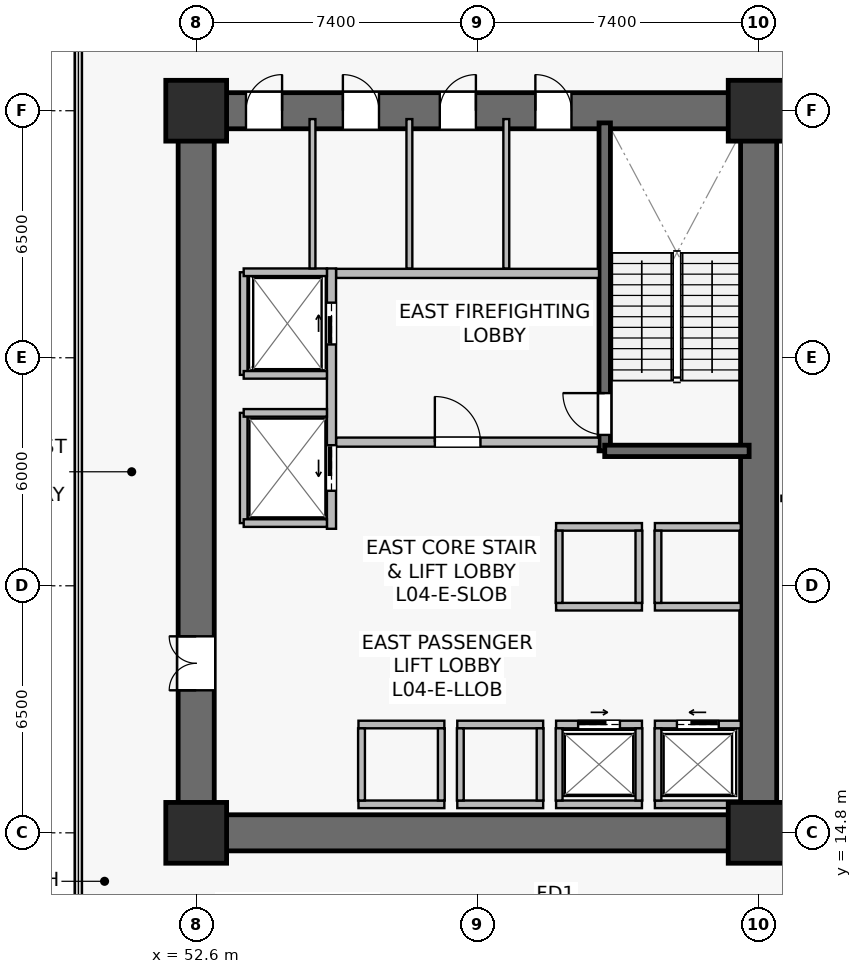
"""IFC4 building model, lengths in metres.
Left out: names, types, materials, properties, quantities, classifications, styles, units other than length and angle.
Written with IfcOpenShell. Run it as: python <this file> out.ifc"""

import sys

from ifc_helpers import new_model, si_unit, direction, frame, frame_2d, origin, origin_2d, place, context, subcontext, project, spatial, rectangle, extrude, source, transform, mapped, element, fill, save


model = new_model("IFC4")
c1 = context("Model", 3, precision=1e-05, world=origin(), true_north=direction((0.0, 1.0)))
c2 = subcontext(c1, "Body", "Model", "MODEL_VIEW")
j1 = project(units=[si_unit("LENGTHUNIT", "METRE"), si_unit("PLANEANGLEUNIT", "RADIAN")], contexts=[c1])
p1 = place(None, origin())
s1 = spatial("IfcSite", under=j1, at=p1, CompositionType="ELEMENT")
p2 = place(p1, origin())
s2 = spatial("IfcBuilding", under=s1, at=p2, CompositionType="ELEMENT")
p3 = place(p2, frame((0.0, 0.0, 15.0)))
s3 = spatial("IfcBuildingStorey", under=s2, at=p3, CompositionType="ELEMENT", Elevation=15.0)
p4 = place(p3, frame((52.125, 14.8, 0.0), z_axis=(0.0, 0.0, 1.0), x_axis=(1.0, 0.0, 0.0)))
e1 = element("IfcWall", 1, at=p4, inside=s3, PredefinedType="SHEAR", context=c2, shape_type="SweptSolid", body=[
    extrude(rectangle(XDim=15.75, YDim=0.95, at=frame_2d((7.875, 0.0))), origin(), (0.0, 0.0, 1.0), 4.45),
])
p5 = place(p3, frame((52.125, 33.8, 0.0), z_axis=(0.0, 0.0, 1.0), x_axis=(1.0, 0.0, 0.0)))
e2 = element("IfcWall", 2, at=p5, inside=s3, PredefinedType="SHEAR", context=c2, shape_type="SweptSolid", body=[
    extrude(rectangle(XDim=15.75, YDim=0.95, at=frame_2d((7.875, 0.0))), origin(), (0.0, 0.0, 1.0), 4.45),
])
p6 = place(p5, frame((9.4, 0.0, 0.0)))
e3 = element("IfcOpeningElement", 3, at=p6, cuts=e2, PredefinedType="OPENING", context=c2, shape_type="SweptSolid", body=[
    extrude(rectangle(XDim=0.95, YDim=2.15, at=frame_2d((0.475, 1.075))), frame((0.0, 0.485, 0.0), z_axis=(0.0, -1.0, 0.0), x_axis=(1.0, 0.0, 0.0)), (0.0, 0.0, 1.0), 0.97),
])
p7 = place(p5, frame((6.885, 0.0, 0.0)))
e4 = element("IfcOpeningElement", 4, at=p7, cuts=e2, PredefinedType="OPENING", context=c2, shape_type="SweptSolid", body=[
    extrude(rectangle(XDim=0.95, YDim=2.15, at=frame_2d((0.475, 1.075))), frame((0.0, 0.485, 0.0), z_axis=(0.0, -1.0, 0.0), x_axis=(1.0, 0.0, 0.0)), (0.0, 0.0, 1.0), 0.97),
])
p8 = place(p5, frame((4.335, 0.0, 0.0)))
e5 = element("IfcOpeningElement", 5, at=p8, cuts=e2, PredefinedType="OPENING", context=c2, shape_type="SweptSolid", body=[
    extrude(rectangle(XDim=0.95, YDim=2.15, at=frame_2d((0.475, 1.075))), frame((0.0, 0.485, 0.0), z_axis=(0.0, -1.0, 0.0), x_axis=(1.0, 0.0, 0.0)), (0.0, 0.0, 1.0), 0.97),
])
p9 = place(p5, frame((1.785, 0.0, 0.0)))
e6 = element("IfcOpeningElement", 6, at=p9, cuts=e2, PredefinedType="OPENING", context=c2, shape_type="SweptSolid", body=[
    extrude(rectangle(XDim=0.95, YDim=2.15, at=frame_2d((0.475, 1.075))), frame((0.0, 0.485, 0.0), z_axis=(0.0, -1.0, 0.0), x_axis=(1.0, 0.0, 0.0)), (0.0, 0.0, 1.0), 0.97),
])
p10 = place(p3, frame((52.6, 15.275, 0.0), z_axis=(0.0, 0.0, 1.0), x_axis=(0.0, 1.0, 0.0)))
e7 = element("IfcWall", 7, at=p10, inside=s3, PredefinedType="SHEAR", context=c2, shape_type="SweptSolid", body=[
    extrude(rectangle(XDim=18.05, YDim=0.95, at=frame_2d((9.025, 0.0))), origin(), (0.0, 0.0, 1.0), 4.45),
])
p11 = place(p10, frame((3.275, 0.0, 0.0)))
e8 = element("IfcOpeningElement", 8, at=p11, cuts=e7, PredefinedType="OPENING", context=c2, shape_type="SweptSolid", body=[
    extrude(rectangle(XDim=1.42, YDim=2.2, at=frame_2d((0.71, 1.1))), frame((0.0, 0.485, 0.0), z_axis=(0.0, -1.0, 0.0), x_axis=(1.0, 0.0, 0.0)), (0.0, 0.0, 1.0), 0.97),
])
p12 = place(p3, frame((67.4, 15.275, 0.0), z_axis=(0.0, 0.0, 1.0), x_axis=(0.0, 1.0, 0.0)))
e9 = element("IfcWall", 9, at=p12, inside=s3, PredefinedType="SHEAR", context=c2, shape_type="SweptSolid", body=[
    extrude(rectangle(XDim=18.05, YDim=0.95, at=frame_2d((9.025, 0.0))), origin(), (0.0, 0.0, 1.0), 4.45),
])
p13 = place(p3, frame((63.35, 24.85, 0.0), z_axis=(0.0, 0.0, 1.0), x_axis=(0.0, 1.0, 0.0)))
e10 = element("IfcWall", 10, at=p13, inside=s3, PredefinedType="SHEAR", context=c2, shape_type="SweptSolid", body=[
    extrude(rectangle(XDim=8.63, YDim=0.3, at=frame_2d((4.315, 0.0))), origin(), (0.0, 0.0, 1.0), 4.45),
])
p14 = place(p13, frame((0.42, 0.0, 0.0)))
e11 = element("IfcOpeningElement", 11, at=p14, cuts=e10, PredefinedType="OPENING", context=c2, shape_type="SweptSolid", body=[
    extrude(rectangle(XDim=1.1, YDim=2.15, at=frame_2d((0.55, 1.075))), frame((0.0, 0.16, 0.0), z_axis=(0.0, -1.0, 0.0), x_axis=(1.0, 0.0, 0.0)), (0.0, 0.0, 1.0), 0.32),
])
p15 = place(p3, frame((63.35, 24.85, 0.0), z_axis=(0.0, 0.0, 1.0), x_axis=(1.0, 0.0, 0.0)))
e12 = element("IfcWall", 12, at=p15, inside=s3, PredefinedType="SHEAR", context=c2, shape_type="SweptSolid", body=[
    extrude(rectangle(XDim=3.8, YDim=0.3, at=frame_2d((1.9, 0.0))), origin(), (0.0, 0.0, 1.0), 4.45),
])
m1 = source(origin(), c2, "Body", "SweptSolid", [
    extrude(rectangle(XDim=1.6, YDim=1.6, at=origin_2d()), origin(), (0.0, 0.0, 1.0), 4.8),
])
for number, where, z_axis, x_axis in (
    (13, (52.6, 14.8, 0.0), (0.0, 0.0, 1.0), (1.0, 0.0, 0.0)),
    (14, (67.4, 14.8, 0.0), (0.0, 0.0, 1.0), (1.0, 0.0, 0.0)),
    (15, (52.6, 33.8, 0.0), (0.0, 0.0, 1.0), (1.0, 0.0, 0.0)),
    (16, (67.4, 33.8, 0.0), (0.0, 0.0, 1.0), (1.0, 0.0, 0.0)),
):
    element("IfcColumn", number, at=place(p3, frame(where, z_axis=z_axis, x_axis=x_axis)), inside=s3, PredefinedType="COLUMN", context=c2, shape_type="MappedRepresentation", body=[
        mapped(m1, transform((0.0, 0.0, 0.0), scale=1.0)),
    ])
p16 = place(p3, frame((56.28, 25.08, 0.0), z_axis=(0.0, 0.0, 1.0), x_axis=(1.0, 0.0, 0.0)))
e17 = element("IfcWall", 17, at=p16, inside=s3, PredefinedType="SOLIDWALL", context=c2, shape_type="SweptSolid", body=[
    extrude(rectangle(XDim=6.92, YDim=0.24, at=frame_2d((3.46, 0.0))), origin(), (0.0, 0.0, 1.0), 3.735),
])
p17 = place(p16, frame((2.6, 0.0, 0.0)))
e18 = element("IfcOpeningElement", 18, at=p17, cuts=e17, PredefinedType="OPENING", context=c2, shape_type="SweptSolid", body=[
    extrude(rectangle(XDim=1.2, YDim=2.16, at=frame_2d((0.6, 1.08))), frame((0.0, 0.13, 0.0), z_axis=(0.0, -1.0, 0.0), x_axis=(1.0, 0.0, 0.0)), (0.0, 0.0, 1.0), 0.26),
])
p18 = place(p3, frame((56.28, 29.52, 0.0), z_axis=(0.0, 0.0, 1.0), x_axis=(1.0, 0.0, 0.0)))
e19 = element("IfcWall", 19, at=p18, inside=s3, PredefinedType="SOLIDWALL", context=c2, shape_type="SweptSolid", body=[
    extrude(rectangle(XDim=6.92, YDim=0.24, at=frame_2d((3.46, 0.0))), origin(), (0.0, 0.0, 1.0), 3.735),
])
p19 = place(p3, frame((56.16, 22.8, 0.0), z_axis=(0.0, 0.0, 1.0), x_axis=(0.0, 1.0, 0.0)))
e20 = element("IfcWall", 20, at=p19, inside=s3, PredefinedType="SOLIDWALL", context=c2, shape_type="SweptSolid", body=[
    extrude(rectangle(XDim=6.85, YDim=0.24, at=frame_2d((3.425, 0.0))), origin(), (0.0, 0.0, 1.0), 3.535),
])
p20 = place(p19, frame((4.85, 0.0, 0.0)))
e21 = element("IfcOpeningElement", 21, at=p20, cuts=e20, PredefinedType="OPENING", context=c2, shape_type="SweptSolid", body=[
    extrude(rectangle(XDim=1.1, YDim=2.22, at=frame_2d((0.55, 1.11))), frame((0.0, 0.13, 0.0), z_axis=(0.0, -1.0, 0.0), x_axis=(1.0, 0.0, 0.0)), (0.0, 0.0, 1.0), 0.26),
])
p21 = place(p19, frame((1.0, 0.0, 0.0)))
e22 = element("IfcOpeningElement", 22, at=p21, cuts=e20, PredefinedType="OPENING", context=c2, shape_type="SweptSolid", body=[
    extrude(rectangle(XDim=1.2, YDim=2.22, at=frame_2d((0.6, 1.11))), frame((0.0, 0.13, 0.0), z_axis=(0.0, -1.0, 0.0), x_axis=(1.0, 0.0, 0.0)), (0.0, 0.0, 1.0), 0.26),
])
p22 = place(p3, frame((64.67, 17.65, 0.0), z_axis=(0.0, 0.0, 1.0), x_axis=(1.0, 0.0, 0.0)))
e23 = element("IfcWall", 23, at=p22, inside=s3, PredefinedType="SOLIDWALL", context=c2, shape_type="SweptSolid", body=[
    extrude(rectangle(XDim=2.26, YDim=0.2, at=frame_2d((1.13, 0.0))), origin(), (0.0, 0.0, 1.0), 4.45),
])
p23 = place(p22, frame((0.58, 0.0, 0.0)))
e24 = element("IfcOpeningElement", 24, at=p23, cuts=e23, PredefinedType="OPENING", context=c2, shape_type="SweptSolid", body=[
    extrude(rectangle(XDim=1.1, YDim=2.22, at=frame_2d((0.55, 1.11))), frame((0.0, 0.11, 0.0), z_axis=(0.0, -1.0, 0.0), x_axis=(1.0, 0.0, 0.0)), (0.0, 0.0, 1.0), 0.22),
])
p24 = place(p3, frame((64.67, 15.55, 0.0), z_axis=(0.0, 0.0, 1.0), x_axis=(1.0, 0.0, 0.0)))
e25 = element("IfcWall", 25, at=p24, inside=s3, PredefinedType="SOLIDWALL", context=c2, shape_type="SweptSolid", body=[
    extrude(rectangle(XDim=2.26, YDim=0.2, at=frame_2d((1.13, 0.0))), origin(), (0.0, 0.0, 1.0), 4.45),
])
p25 = place(p3, frame((64.75, 15.65, 0.0), z_axis=(0.0, 0.0, 1.0), x_axis=(0.0, 1.0, 0.0)))
e26 = element("IfcWall", 26, at=p25, inside=s3, PredefinedType="SOLIDWALL", context=c2, shape_type="SweptSolid", body=[
    extrude(rectangle(XDim=1.9, YDim=0.18, at=frame_2d((0.95, 0.0))), origin(), (0.0, 0.0, 1.0), 4.45),
])
p26 = place(p3, frame((62.07, 17.65, 0.0), z_axis=(0.0, 0.0, 1.0), x_axis=(1.0, 0.0, 0.0)))
e27 = element("IfcWall", 27, at=p26, inside=s3, PredefinedType="SOLIDWALL", context=c2, shape_type="SweptSolid", body=[
    extrude(rectangle(XDim=2.26, YDim=0.2, at=frame_2d((1.13, 0.0))), origin(), (0.0, 0.0, 1.0), 4.45),
])
p27 = place(p26, frame((0.58, 0.0, 0.0)))
e28 = element("IfcOpeningElement", 28, at=p27, cuts=e27, PredefinedType="OPENING", context=c2, shape_type="SweptSolid", body=[
    extrude(rectangle(XDim=1.1, YDim=2.22, at=frame_2d((0.55, 1.11))), frame((0.0, 0.11, 0.0), z_axis=(0.0, -1.0, 0.0), x_axis=(1.0, 0.0, 0.0)), (0.0, 0.0, 1.0), 0.22),
])
p28 = place(p3, frame((62.07, 15.55, 0.0), z_axis=(0.0, 0.0, 1.0), x_axis=(1.0, 0.0, 0.0)))
e29 = element("IfcWall", 29, at=p28, inside=s3, PredefinedType="SOLIDWALL", context=c2, shape_type="SweptSolid", body=[
    extrude(rectangle(XDim=2.26, YDim=0.2, at=frame_2d((1.13, 0.0))), origin(), (0.0, 0.0, 1.0), 4.45),
])
for number, where, z_axis, x_axis in (
    (30, (62.15, 15.65, 0.0), (0.0, 0.0, 1.0), (0.0, 1.0, 0.0)),
    (31, (64.25, 15.65, 0.0), (0.0, 0.0, 1.0), (0.0, 1.0, 0.0)),
):
    element("IfcWall", number, at=place(p3, frame(where, z_axis=z_axis, x_axis=x_axis)), inside=s3, PredefinedType="SOLIDWALL", context=c2, shape_type="SweptSolid", body=[
        extrude(rectangle(XDim=1.9, YDim=0.18, at=frame_2d((0.95, 0.0))), origin(), (0.0, 0.0, 1.0), 4.45),
    ])
for number, where, z_axis, x_axis in (
    (32, (59.47, 17.65, 0.0), (0.0, 0.0, 1.0), (1.0, 0.0, 0.0)),
    (33, (59.47, 15.55, 0.0), (0.0, 0.0, 1.0), (1.0, 0.0, 0.0)),
):
    element("IfcWall", number, at=place(p3, frame(where, z_axis=z_axis, x_axis=x_axis)), inside=s3, PredefinedType="SOLIDWALL", context=c2, shape_type="SweptSolid", body=[
        extrude(rectangle(XDim=2.26, YDim=0.2, at=frame_2d((1.13, 0.0))), origin(), (0.0, 0.0, 1.0), 3.735),
    ])
for number, where, z_axis, x_axis in (
    (34, (59.55, 15.65, 0.0), (0.0, 0.0, 1.0), (0.0, 1.0, 0.0)),
    (35, (61.65, 15.65, 0.0), (0.0, 0.0, 1.0), (0.0, 1.0, 0.0)),
):
    element("IfcWall", number, at=place(p3, frame(where, z_axis=z_axis, x_axis=x_axis)), inside=s3, PredefinedType="SOLIDWALL", context=c2, shape_type="SweptSolid", body=[
        extrude(rectangle(XDim=1.9, YDim=0.18, at=frame_2d((0.95, 0.0))), origin(), (0.0, 0.0, 1.0), 4.45),
    ])
for number, where, z_axis, x_axis in (
    (36, (56.87, 17.65, 0.0), (0.0, 0.0, 1.0), (1.0, 0.0, 0.0)),
    (37, (56.87, 15.55, 0.0), (0.0, 0.0, 1.0), (1.0, 0.0, 0.0)),
):
    element("IfcWall", number, at=place(p3, frame(where, z_axis=z_axis, x_axis=x_axis)), inside=s3, PredefinedType="SOLIDWALL", context=c2, shape_type="SweptSolid", body=[
        extrude(rectangle(XDim=2.26, YDim=0.2, at=frame_2d((1.13, 0.0))), origin(), (0.0, 0.0, 1.0), 4.45),
    ])
for number, where, z_axis, x_axis in (
    (38, (56.95, 15.65, 0.0), (0.0, 0.0, 1.0), (0.0, 1.0, 0.0)),
    (39, (59.05, 15.65, 0.0), (0.0, 0.0, 1.0), (0.0, 1.0, 0.0)),
):
    element("IfcWall", number, at=place(p3, frame(where, z_axis=z_axis, x_axis=x_axis)), inside=s3, PredefinedType="SOLIDWALL", context=c2, shape_type="SweptSolid", body=[
        extrude(rectangle(XDim=1.9, YDim=0.18, at=frame_2d((0.95, 0.0))), origin(), (0.0, 0.0, 1.0), 4.45),
    ])
for number, where, z_axis, x_axis in (
    (40, (64.67, 20.75, 0.0), (0.0, 0.0, 1.0), (1.0, 0.0, 0.0)),
    (41, (64.67, 22.85, 0.0), (0.0, 0.0, 1.0), (1.0, 0.0, 0.0)),
):
    element("IfcWall", number, at=place(p3, frame(where, z_axis=z_axis, x_axis=x_axis)), inside=s3, PredefinedType="SOLIDWALL", context=c2, shape_type="SweptSolid", body=[
        extrude(rectangle(XDim=2.26, YDim=0.2, at=frame_2d((1.13, 0.0))), origin(), (0.0, 0.0, 1.0), 4.45),
    ])
p29 = place(p3, frame((64.75, 20.85, 0.0), z_axis=(0.0, 0.0, 1.0), x_axis=(0.0, 1.0, 0.0)))
e42 = element("IfcWall", 42, at=p29, inside=s3, PredefinedType="SOLIDWALL", context=c2, shape_type="SweptSolid", body=[
    extrude(rectangle(XDim=1.9, YDim=0.18, at=frame_2d((0.95, 0.0))), origin(), (0.0, 0.0, 1.0), 4.45),
])
for number, where, z_axis, x_axis in (
    (43, (62.07, 20.75, 0.0), (0.0, 0.0, 1.0), (1.0, 0.0, 0.0)),
    (44, (62.07, 22.85, 0.0), (0.0, 0.0, 1.0), (1.0, 0.0, 0.0)),
):
    element("IfcWall", number, at=place(p3, frame(where, z_axis=z_axis, x_axis=x_axis)), inside=s3, PredefinedType="SOLIDWALL", context=c2, shape_type="SweptSolid", body=[
        extrude(rectangle(XDim=2.26, YDim=0.2, at=frame_2d((1.13, 0.0))), origin(), (0.0, 0.0, 1.0), 4.45),
    ])
for number, where, z_axis, x_axis in (
    (45, (62.15, 20.85, 0.0), (0.0, 0.0, 1.0), (0.0, 1.0, 0.0)),
    (46, (64.25, 20.85, 0.0), (0.0, 0.0, 1.0), (0.0, 1.0, 0.0)),
):
    element("IfcWall", number, at=place(p3, frame(where, z_axis=z_axis, x_axis=x_axis)), inside=s3, PredefinedType="SOLIDWALL", context=c2, shape_type="SweptSolid", body=[
        extrude(rectangle(XDim=1.9, YDim=0.18, at=frame_2d((0.95, 0.0))), origin(), (0.0, 0.0, 1.0), 4.45),
    ])
p30 = place(p3, frame((53.85, 26.85, 0.0), z_axis=(0.0, 0.0, 1.0), x_axis=(0.0, 1.0, 0.0)))
e47 = element("IfcWall", 47, at=p30, inside=s3, PredefinedType="SOLIDWALL", context=c2, shape_type="SweptSolid", body=[
    extrude(rectangle(XDim=2.7, YDim=0.2, at=frame_2d((1.35, 0.0))), origin(), (0.0, 0.0, 1.0), 4.45),
])
p31 = place(p3, frame((53.85, 29.55, 0.0), z_axis=(0.0, 0.0, 1.0), x_axis=(1.0, 0.0, 0.0)))
e48 = element("IfcWall", 48, at=p31, inside=s3, PredefinedType="SOLIDWALL", context=c2, shape_type="SweptSolid", body=[
    extrude(rectangle(XDim=2.19, YDim=0.2, at=frame_2d((1.095, 0.0))), origin(), (0.0, 0.0, 1.0), 4.45),
])
p32 = place(p3, frame((53.85, 26.85, 0.0), z_axis=(0.0, 0.0, 1.0), x_axis=(1.0, 0.0, 0.0)))
e49 = element("IfcWall", 49, at=p32, inside=s3, PredefinedType="SOLIDWALL", context=c2, shape_type="SweptSolid", body=[
    extrude(rectangle(XDim=2.19, YDim=0.2, at=frame_2d((1.095, 0.0))), origin(), (0.0, 0.0, 1.0), 3.847),
])
p33 = place(p3, frame((53.85, 22.95, 0.0), z_axis=(0.0, 0.0, 1.0), x_axis=(0.0, 1.0, 0.0)))
e50 = element("IfcWall", 50, at=p33, inside=s3, PredefinedType="SOLIDWALL", context=c2, shape_type="SweptSolid", body=[
    extrude(rectangle(XDim=2.9, YDim=0.2, at=frame_2d((1.45, 0.0))), origin(), (0.0, 0.0, 1.0), 3.535),
])
for number, where, z_axis, x_axis in (
    (51, (53.85, 25.85, 0.0), (0.0, 0.0, 1.0), (1.0, 0.0, 0.0)),
    (52, (53.85, 22.95, 0.0), (0.0, 0.0, 1.0), (1.0, 0.0, 0.0)),
):
    element("IfcWall", number, at=place(p3, frame(where, z_axis=z_axis, x_axis=x_axis)), inside=s3, PredefinedType="SOLIDWALL", context=c2, shape_type="SweptSolid", body=[
        extrude(rectangle(XDim=2.19, YDim=0.2, at=frame_2d((1.095, 0.0))), origin(), (0.0, 0.0, 1.0), 4.45),
    ])
for number, where, z_axis, x_axis in (
    (53, (60.76, 29.65, 0.0), (0.0, 0.0, 1.0), (0.0, 1.0, 0.0)),
    (54, (58.21, 29.65, 0.0), (0.0, 0.0, 1.0), (0.0, 1.0, 0.0)),
    (55, (55.66, 29.65, 0.0), (0.0, 0.0, 1.0), (0.0, 1.0, 0.0)),
):
    element("IfcWall", number, at=place(p3, frame(where, z_axis=z_axis, x_axis=x_axis)), inside=s3, PredefinedType="PLUMBINGWALL", context=c2, shape_type="SweptSolid", body=[
        extrude(rectangle(XDim=3.93, YDim=0.155, at=frame_2d((1.965, 0.0))), origin(), (0.0, 0.0, 1.0), 4.45),
    ])
m2 = source(origin(), c2, "Body", "SweptSolid", [
    extrude(rectangle(XDim=1.1, YDim=2.15, at=frame_2d((0.55, 1.075))), frame((0.0, 0.025, 0.0), z_axis=(0.0, -1.0, 0.0), x_axis=(1.0, 0.0, 0.0)), (0.0, 0.0, 1.0), 0.05),
])
p34 = place(p14, origin())
e56 = element("IfcDoor", 56, at=p34, inside=s3, OperationType="SINGLE_SWING_RIGHT", PredefinedType="DOOR", context=c2, shape_type="MappedRepresentation", body=[
    mapped(m2, transform((0.0, 0.0, 0.0), scale=1.0)),
])
fill(e11, e56)
m3 = source(origin(), c2, "Body", "SweptSolid", [
    extrude(rectangle(XDim=1.2, YDim=2.16, at=frame_2d((0.6, 1.08))), frame((0.0, 0.025, 0.0), z_axis=(0.0, -1.0, 0.0), x_axis=(1.0, 0.0, 0.0)), (0.0, 0.0, 1.0), 0.05),
])
p35 = place(p17, origin())
e57 = element("IfcDoor", 57, at=p35, inside=s3, OperationType="SINGLE_SWING_LEFT", PredefinedType="DOOR", context=c2, shape_type="MappedRepresentation", body=[
    mapped(m3, transform((0.0, 0.0, 0.0), scale=1.0)),
])
fill(e18, e57)
m4 = source(origin(), c2, "Body", "SweptSolid", [
    extrude(rectangle(XDim=1.1, YDim=2.22, at=frame_2d((0.55, 1.11))), frame((0.0, 0.025, 0.0), z_axis=(0.0, -1.0, 0.0), x_axis=(1.0, 0.0, 0.0)), (0.0, 0.0, 1.0), 0.05),
])
p36 = place(p23, origin())
e58 = element("IfcDoor", 58, at=p36, inside=s3, OperationType="SLIDING_TO_LEFT", PredefinedType="USERDEFINED", context=c2, shape_type="MappedRepresentation", body=[
    mapped(m4, transform((0.0, 0.0, 0.0), scale=1.0)),
])
fill(e24, e58)
p37 = place(p27, origin())
e59 = element("IfcDoor", 59, at=p37, inside=s3, OperationType="SLIDING_TO_RIGHT", PredefinedType="USERDEFINED", context=c2, shape_type="MappedRepresentation", body=[
    mapped(m4, transform((0.0, 0.0, 0.0), scale=1.0)),
])
fill(e28, e59)
p38 = place(p20, origin())
e60 = element("IfcDoor", 60, at=p38, inside=s3, OperationType="SLIDING_TO_RIGHT", PredefinedType="USERDEFINED", context=c2, shape_type="MappedRepresentation", body=[
    mapped(m4, transform((0.0, 0.0, 0.0), scale=1.0)),
])
fill(e21, e60)
m5 = source(origin(), c2, "Body", "SweptSolid", [
    extrude(rectangle(XDim=1.2, YDim=2.22, at=frame_2d((0.6, 1.11))), frame((0.0, 0.025, 0.0), z_axis=(0.0, -1.0, 0.0), x_axis=(1.0, 0.0, 0.0)), (0.0, 0.0, 1.0), 0.05),
])
p39 = place(p21, origin())
e61 = element("IfcDoor", 61, at=p39, inside=s3, OperationType="SLIDING_TO_LEFT", PredefinedType="USERDEFINED", context=c2, shape_type="MappedRepresentation", body=[
    mapped(m5, transform((0.0, 0.0, 0.0), scale=1.0)),
])
fill(e22, e61)
m6 = source(origin(), c2, "Body", "SweptSolid", [
    extrude(rectangle(XDim=1.42, YDim=2.2, at=frame_2d((0.71, 1.1))), frame((0.0, 0.025, 0.0), z_axis=(0.0, -1.0, 0.0), x_axis=(1.0, 0.0, 0.0)), (0.0, 0.0, 1.0), 0.05),
])
p40 = place(p11, origin())
e62 = element("IfcDoor", 62, at=p40, inside=s3, OperationType="DOUBLE_DOOR_SINGLE_SWING", PredefinedType="DOOR", context=c2, shape_type="MappedRepresentation", body=[
    mapped(m6, transform((0.0, 0.0, 0.0), scale=1.0)),
])
fill(e8, e62)
m7 = source(origin(), c2, "Body", "SweptSolid", [
    extrude(rectangle(XDim=0.95, YDim=2.15, at=frame_2d((0.475, 1.075))), frame((0.0, 0.025, 0.0), z_axis=(0.0, -1.0, 0.0), x_axis=(1.0, 0.0, 0.0)), (0.0, 0.0, 1.0), 0.05),
])
p41 = place(p6, origin())
e63 = element("IfcDoor", 63, at=p41, inside=s3, OperationType="SINGLE_SWING_LEFT", PredefinedType="DOOR", context=c2, shape_type="MappedRepresentation", body=[
    mapped(m7, transform((0.0, 0.0, 0.0), scale=1.0)),
])
fill(e3, e63)
p42 = place(p7, origin())
e64 = element("IfcDoor", 64, at=p42, inside=s3, OperationType="SINGLE_SWING_RIGHT", PredefinedType="DOOR", context=c2, shape_type="MappedRepresentation", body=[
    mapped(m7, transform((0.0, 0.0, 0.0), scale=1.0)),
])
fill(e4, e64)
p43 = place(p8, origin())
e65 = element("IfcDoor", 65, at=p43, inside=s3, OperationType="SINGLE_SWING_LEFT", PredefinedType="DOOR", context=c2, shape_type="MappedRepresentation", body=[
    mapped(m7, transform((0.0, 0.0, 0.0), scale=1.0)),
])
fill(e5, e65)
p44 = place(p9, origin())
e66 = element("IfcDoor", 66, at=p44, inside=s3, OperationType="SINGLE_SWING_RIGHT", PredefinedType="DOOR", context=c2, shape_type="MappedRepresentation", body=[
    mapped(m7, transform((0.0, 0.0, 0.0), scale=1.0)),
])
fill(e6, e66)
save(model, sys.argv[1])
